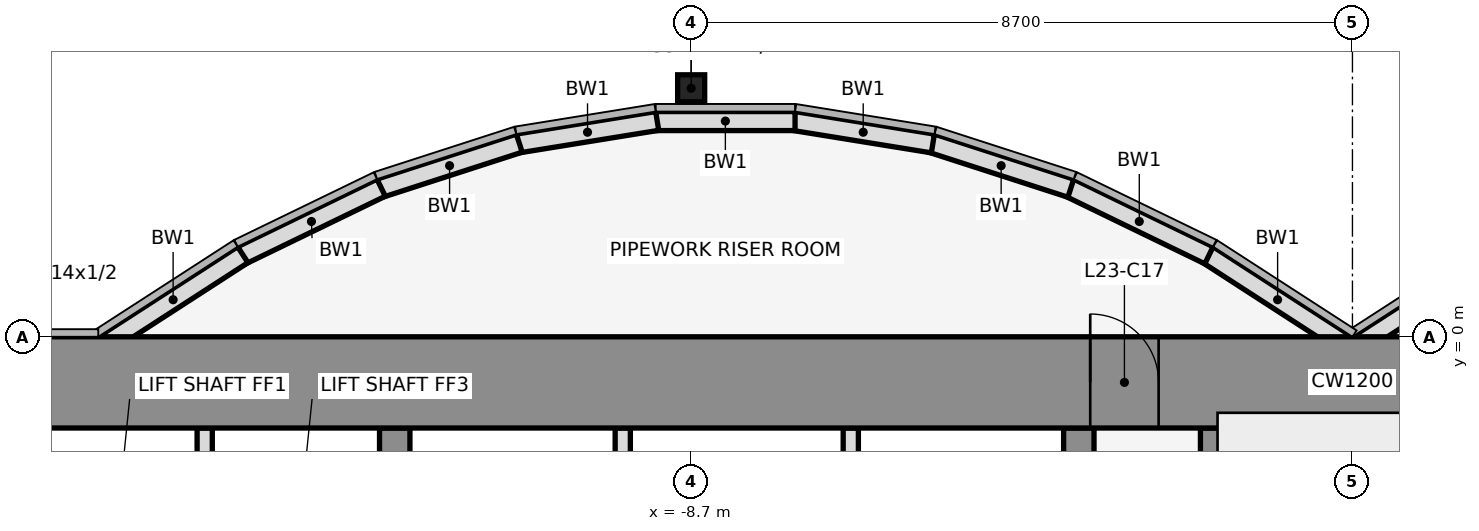
"""IFC4 building model, lengths in metres.
Left out: names, types, materials, properties, quantities, classifications, styles, units other than length and angle.
Written with IfcOpenShell. Run it as: python <this file> out.ifc"""

import sys

from ifc_helpers import new_model, si_unit, direction, frame, frame_2d, origin, origin_2d, place, context, subcontext, project, spatial, rectangle, hollow_rectangle, extrude, element, fill, save


model = new_model("IFC4")
c1 = context("Model", 3, precision=1e-05, world=origin(), true_north=direction((0.0, 1.0)))
c2 = subcontext(c1, "Body", "Model", "MODEL_VIEW")
j1 = project(units=[si_unit("LENGTHUNIT", "METRE"), si_unit("PLANEANGLEUNIT", "RADIAN")], contexts=[c1])
p1 = place(None, origin())
s1 = spatial("IfcSite", under=j1, at=p1, CompositionType="ELEMENT")
p2 = place(p1, origin())
s2 = spatial("IfcBuilding", under=s1, at=p2, CompositionType="ELEMENT")
p3 = place(p2, frame((0.0, 0.0, 110.4)))
s3 = spatial("IfcBuildingStorey", under=s2, at=p3, CompositionType="ELEMENT", Elevation=110.4)
p4 = place(p3, frame((-8.7, 3.269, 0.0), z_axis=(0.0, 0.0, 1.0), x_axis=(1.0, 0.0, 0.0)))
e1 = element("IfcColumn", 1, at=p4, inside=s3, PredefinedType="COLUMN", context=c2, shape_type="SweptSolid", body=[
    extrude(hollow_rectangle(XDim=0.356, YDim=0.356, WallThickness=0.012, at=origin_2d()), origin(), (0.0, 0.0, 1.0), 4.1),
])
for number, where, z_axis, x_axis in (
    (2, (1.901, 1.08, 0.0), (0.0, 0.0, 1.0), (-0.84, -0.543, 0.0)),
    (3, (-0.068, -0.105, 0.0), (0.0, 0.0, 1.0), (-0.84, 0.543, 0.0)),
):
    element("IfcWall", number, at=place(p3, frame(where, z_axis=z_axis, x_axis=x_axis)), inside=s3, PredefinedType="STANDARD", context=c2, shape_type="SweptSolid", body=[
        extrude(rectangle(XDim=2.183, YDim=0.25, at=frame_2d((1.091, 0.0))), origin(), (0.0, 0.0, 1.0), 3.95),
    ])
p5 = place(p3, frame((-1.888, 1.073, 0.0), z_axis=(0.0, 0.0, 1.0), x_axis=(-0.89982408427, 0.436252928206, 0.0)))
e4 = element("IfcWall", 4, at=p5, inside=s3, PredefinedType="STANDARD", context=c2, shape_type="SweptSolid", body=[
    extrude(rectangle(XDim=2.038, YDim=0.25, at=frame_2d((1.019, 0.0))), origin(), (0.0, 0.0, 1.0), 3.95),
])
p6 = place(p3, frame((-3.705, 1.955, 0.0), z_axis=(0.0, 0.0, 1.0), x_axis=(-0.951495806175, 0.307661714928, 0.0)))
e5 = element("IfcWall", 5, at=p6, inside=s3, PredefinedType="STANDARD", context=c2, shape_type="SweptSolid", body=[
    extrude(rectangle(XDim=1.927, YDim=0.25, at=frame_2d((0.963, 0.0))), origin(), (0.0, 0.0, 1.0), 3.95),
])
p7 = place(p3, frame((-5.52, 2.543, 0.0), z_axis=(0.0, 0.0, 1.0), x_axis=(-0.987181718931, 0.159600293885, 0.0)))
e6 = element("IfcWall", 6, at=p7, inside=s3, PredefinedType="STANDARD", context=c2, shape_type="SweptSolid", body=[
    extrude(rectangle(XDim=1.857, YDim=0.25, at=frame_2d((0.929, 0.0))), origin(), (0.0, 0.0, 1.0), 3.95),
])
p8 = place(p3, frame((-7.333, 2.838, 0.0), z_axis=(0.0, 0.0, 1.0), x_axis=(-1.0, 0.0, 0.0)))
e7 = element("IfcWall", 7, at=p8, inside=s3, PredefinedType="STANDARD", context=c2, shape_type="SweptSolid", body=[
    extrude(rectangle(XDim=1.833, YDim=0.25, at=frame_2d((0.917, 0.0))), origin(), (0.0, 0.0, 1.0), 3.95),
])
p9 = place(p3, frame((-9.147, 2.84, 0.0), z_axis=(0.0, 0.0, 1.0), x_axis=(-0.987181718931, -0.159600293885, 0.0)))
e8 = element("IfcWall", 8, at=p9, inside=s3, PredefinedType="STANDARD", context=c2, shape_type="SweptSolid", body=[
    extrude(rectangle(XDim=1.857, YDim=0.25, at=frame_2d((0.929, 0.0))), origin(), (0.0, 0.0, 1.0), 3.95),
])
p10 = place(p3, frame((-10.962, 2.548, 0.0), z_axis=(0.0, 0.0, 1.0), x_axis=(-0.951495806175, -0.307661714928, 0.0)))
e9 = element("IfcWall", 9, at=p10, inside=s3, PredefinedType="STANDARD", context=c2, shape_type="SweptSolid", body=[
    extrude(rectangle(XDim=1.927, YDim=0.25, at=frame_2d((0.963, 0.0))), origin(), (0.0, 0.0, 1.0), 3.95),
])
p11 = place(p3, frame((-12.779, 1.962, 0.0), z_axis=(0.0, 0.0, 1.0), x_axis=(-0.89982408427, -0.436252928206, 0.0)))
e10 = element("IfcWall", 10, at=p11, inside=s3, PredefinedType="STANDARD", context=c2, shape_type="SweptSolid", body=[
    extrude(rectangle(XDim=2.038, YDim=0.25, at=frame_2d((1.019, 0.0))), origin(), (0.0, 0.0, 1.0), 3.95),
])
p12 = place(p3, frame((-14.599, 1.08, 0.0), z_axis=(0.0, 0.0, 1.0), x_axis=(-0.83981312244, -0.542875602121, 0.0)))
e11 = element("IfcWall", 11, at=p12, inside=s3, PredefinedType="STANDARD", context=c2, shape_type="SweptSolid", body=[
    extrude(rectangle(XDim=2.183, YDim=0.25, at=frame_2d((1.091, 0.0))), origin(), (0.0, 0.0, 1.0), 3.95),
])
p13 = place(p3, frame((-15.1, -4.6, 0.0), z_axis=(0.0, 0.0, 1.0), x_axis=(0.0, 1.0, 0.0)))
e12 = element("IfcWall", 12, at=p13, inside=s3, PredefinedType="PARTITIONING", context=c2, shape_type="SweptSolid", body=[
    extrude(rectangle(XDim=3.4, YDim=0.2, at=frame_2d((1.7, 0.0))), origin(), (0.0, 0.0, 1.0), 3.018),
])
p14 = place(p3, frame((-12.6, -11.8, 0.0), z_axis=(0.0, 0.0, 1.0), x_axis=(0.0, 1.0, 0.0)))
e13 = element("IfcWall", 13, at=p14, inside=s3, PredefinedType="SHEAR", context=c2, shape_type="SweptSolid", body=[
    extrude(rectangle(XDim=10.6, YDim=0.4, at=frame_2d((5.3, 0.0))), origin(), (0.0, 0.0, 1.0), 4.1),
])
p15 = place(p14, frame((4.75, 0.0, 0.0)))
e14 = element("IfcOpeningElement", 14, at=p15, cuts=e13, PredefinedType="OPENING", context=c2, shape_type="SweptSolid", body=[
    extrude(rectangle(XDim=1.1, YDim=2.1, at=frame_2d((0.55, 1.05))), frame((0.0, 0.212, 0.0), z_axis=(0.0, -1.0, 0.0), x_axis=(1.0, 0.0, 0.0)), (0.0, 0.0, 1.0), 0.424),
])
for number, where, z_axis, x_axis in (
    (15, (-9.6, -4.6, 0.0), (0.0, 0.0, 1.0), (0.0, 1.0, 0.0)),
    (16, (-6.6, -4.6, 0.0), (0.0, 0.0, 1.0), (0.0, 1.0, 0.0)),
):
    element("IfcWall", number, at=place(p3, frame(where, z_axis=z_axis, x_axis=x_axis)), inside=s3, PredefinedType="PARTITIONING", context=c2, shape_type="SweptSolid", body=[
        extrude(rectangle(XDim=3.4, YDim=0.2, at=frame_2d((1.7, 0.0))), origin(), (0.0, 0.0, 1.0), 3.018),
    ])
p16 = place(p3, frame((-3.6, -11.8, 0.0), z_axis=(0.0, 0.0, 1.0), x_axis=(0.0, 1.0, 0.0)))
e17 = element("IfcWall", 17, at=p16, inside=s3, PredefinedType="SHEAR", context=c2, shape_type="SweptSolid", body=[
    extrude(rectangle(XDim=10.6, YDim=0.4, at=frame_2d((5.3, 0.0))), origin(), (0.0, 0.0, 1.0), 4.1),
])
p17 = place(p16, frame((4.85, 0.0, 0.0)))
e18 = element("IfcOpeningElement", 18, at=p17, cuts=e17, PredefinedType="OPENING", context=c2, shape_type="SweptSolid", body=[
    extrude(rectangle(XDim=0.9, YDim=2.1, at=frame_2d((0.45, 1.05))), frame((0.0, 0.212, 0.0), z_axis=(0.0, -1.0, 0.0), x_axis=(1.0, 0.0, 0.0)), (0.0, 0.0, 1.0), 0.424),
])
p18 = place(p3, frame((-1.8, -11.8, 0.0), z_axis=(0.0, 0.0, 1.0), x_axis=(0.0, 1.0, 0.0)))
e19 = element("IfcWall", 19, at=p18, inside=s3, PredefinedType="SHEAR", context=c2, shape_type="SweptSolid", body=[
    extrude(rectangle(XDim=10.6, YDim=0.4, at=frame_2d((5.3, 0.0))), origin(), (0.0, 0.0, 1.0), 4.1),
])
p19 = place(p3, frame((-22.0, -0.6, 0.0), z_axis=(0.0, 0.0, 1.0), x_axis=(1.0, 0.0, 0.0)))
e20 = element("IfcWall", 20, at=p19, inside=s3, PredefinedType="SHEAR", context=c2, shape_type="SweptSolid", body=[
    extrude(rectangle(XDim=44.0, YDim=1.2, at=frame_2d((22.0, 0.0))), origin(), (0.0, 0.0, 1.0), 4.1),
])
p20 = place(p19, frame((18.55, 0.0, 0.0)))
e21 = element("IfcOpeningElement", 21, at=p20, cuts=e20, PredefinedType="OPENING", context=c2, shape_type="SweptSolid", body=[
    extrude(rectangle(XDim=0.9, YDim=2.1, at=frame_2d((0.45, 1.05))), frame((0.0, 0.612, 0.0), z_axis=(0.0, -1.0, 0.0), x_axis=(1.0, 0.0, 0.0)), (0.0, 0.0, 1.0), 1.224),
])
p21 = place(p19, frame((24.55, 0.0, 0.0)))
e22 = element("IfcOpeningElement", 22, at=p21, cuts=e20, PredefinedType="OPENING", context=c2, shape_type="SweptSolid", body=[
    extrude(rectangle(XDim=0.9, YDim=2.1, at=frame_2d((0.45, 1.05))), frame((0.0, 0.612, 0.0), z_axis=(0.0, -1.0, 0.0), x_axis=(1.0, 0.0, 0.0)), (0.0, 0.0, 1.0), 1.224),
])
p22 = place(p20, origin())
e23 = element("IfcDoor", 23, at=p22, inside=s3, OperationType="SINGLE_SWING_LEFT", PredefinedType="DOOR", context=c2, shape_type="SweptSolid", body=[
    extrude(rectangle(XDim=0.9, YDim=2.1, at=frame_2d((0.45, 1.05))), frame((0.0, 0.025, 0.0), z_axis=(0.0, -1.0, 0.0), x_axis=(1.0, 0.0, 0.0)), (0.0, 0.0, 1.0), 0.05),
])
fill(e21, e23)
save(model, sys.argv[1])
